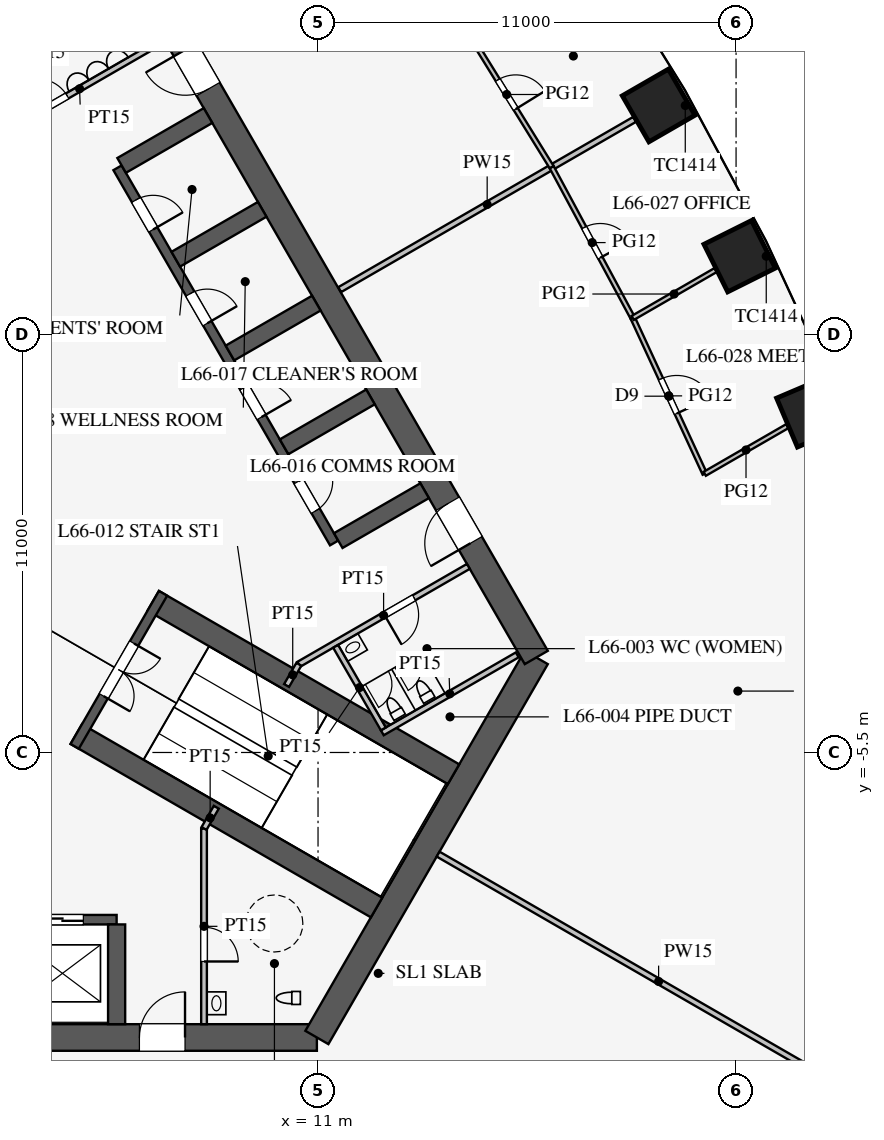
"""IFC4 building model, lengths in metres.
Left out: names, types, materials, properties, quantities, classifications, styles, units other than length and angle.
Written with IfcOpenShell. Run it as: python <this file> out.ifc"""

import sys

from ifc_helpers import new_model, si_unit, direction, frame, frame_2d, origin, origin_2d, place, context, subcontext, project, spatial, rectangle, extrude, element, fill, save


model = new_model("IFC4")
c1 = context("Model", 3, precision=1e-05, world=origin(), true_north=direction((0.0, 1.0)))
c2 = subcontext(c1, "Body", "Model", "MODEL_VIEW")
j1 = project(units=[si_unit("LENGTHUNIT", "METRE"), si_unit("PLANEANGLEUNIT", "RADIAN")], contexts=[c1])
p1 = place(None, origin())
s1 = spatial("IfcSite", under=j1, at=p1, CompositionType="ELEMENT")
p2 = place(p1, origin())
s2 = spatial("IfcBuilding", under=s1, at=p2, CompositionType="ELEMENT")
p3 = place(p2, frame((0.0, 0.0, 288.9)))
s3 = spatial("IfcBuildingStorey", under=s2, at=p3, CompositionType="ELEMENT", Elevation=288.9)
for number, where, z_axis, x_axis in (
    (1, (23.985, 3.455, 0.0), (0.0, 0.0, 1.0), (-0.391, 0.92, 0.0)),
    (2, (22.094, 7.56, 0.0), (0.0, 0.0, 1.0), (-0.447, 0.895, 0.0)),
    (3, (19.963, 11.526, 0.0), (0.0, 0.0, 1.0), (-0.5, 0.866, 0.0)),
):
    element("IfcColumn", number, at=place(p3, frame(where, z_axis=z_axis, x_axis=x_axis)), inside=s3, PredefinedType="COLUMN", context=c2, shape_type="SweptSolid", body=[
        extrude(rectangle(XDim=1.4, YDim=1.4, at=origin_2d()), origin(), (0.0, 0.0, 1.0), 4.2),
    ])
p4 = place(p3, frame((-10.97, -13.0, 0.0), z_axis=(0.0, 0.0, 1.0), x_axis=(1.0, 0.0, 0.0)))
e4 = element("IfcWall", 4, at=p4, inside=s3, PredefinedType="SHEAR", context=c2, shape_type="SweptSolid", body=[
    extrude(rectangle(XDim=21.939, YDim=0.7, at=frame_2d((10.97, 0.0))), origin(), (0.0, 0.0, 1.0), 4.2),
])
p5 = place(p4, frame((17.27, 0.0, 0.0)))
e5 = element("IfcOpeningElement", 5, at=p5, cuts=e4, PredefinedType="OPENING", context=c2, shape_type="SweptSolid", body=[
    extrude(rectangle(XDim=1.2, YDim=2.1, at=frame_2d((0.6, 1.05))), frame((0.0, 0.36, 0.0), z_axis=(0.0, -1.0, 0.0), x_axis=(1.0, 0.0, 0.0)), (0.0, 0.0, 1.0), 0.72),
])
p6 = place(p4, frame((3.47, 0.0, 0.0)))
e6 = element("IfcOpeningElement", 6, at=p6, cuts=e4, PredefinedType="OPENING", context=c2, shape_type="SweptSolid", body=[
    extrude(rectangle(XDim=1.2, YDim=2.1, at=frame_2d((0.6, 1.05))), frame((0.0, 0.36, 0.0), z_axis=(0.0, -1.0, 0.0), x_axis=(1.0, 0.0, 0.0)), (0.0, 0.0, 1.0), 0.72),
])
p7 = place(p3, frame((10.97, -13.0, 0.0), z_axis=(0.0, 0.0, 1.0), x_axis=(0.499995765644, 0.866027848477, 0.0)))
e7 = element("IfcWall", 7, at=p7, inside=s3, PredefinedType="SHEAR", context=c2, shape_type="SweptSolid", body=[
    extrude(rectangle(XDim=11.547, YDim=0.7, at=frame_2d((5.773, 0.0))), origin(), (0.0, 0.0, 1.0), 4.2),
])
p8 = place(p3, frame((16.743, -3.0, 0.0), z_axis=(0.0, 0.0, 1.0), x_axis=(-0.500002442456, 0.866023993627, 0.0)))
e8 = element("IfcWall", 8, at=p8, inside=s3, PredefinedType="SHEAR", context=c2, shape_type="SweptSolid", body=[
    extrude(rectangle(XDim=21.939, YDim=0.7, at=frame_2d((10.97, 0.0))), origin(), (0.0, 0.0, 1.0), 4.2),
])
p9 = place(p8, frame((17.27, 0.0, 0.0)))
e9 = element("IfcOpeningElement", 9, at=p9, cuts=e8, PredefinedType="OPENING", context=c2, shape_type="SweptSolid", body=[
    extrude(rectangle(XDim=1.2, YDim=2.1, at=frame_2d((0.6, 1.05))), frame((0.0, 0.36, 0.0), z_axis=(0.0, -1.0, 0.0), x_axis=(1.0, 0.0, 0.0)), (0.0, 0.0, 1.0), 0.72),
])
p10 = place(p8, frame((3.47, 0.0, 0.0)))
e10 = element("IfcOpeningElement", 10, at=p10, cuts=e8, PredefinedType="OPENING", context=c2, shape_type="SweptSolid", body=[
    extrude(rectangle(XDim=1.2, YDim=2.1, at=frame_2d((0.6, 1.05))), frame((0.0, 0.36, 0.0), z_axis=(0.0, -1.0, 0.0), x_axis=(1.0, 0.0, 0.0)), (0.0, 0.0, 1.0), 0.72),
])
p11 = place(p3, frame((-5.7, -9.9, 0.0), z_axis=(0.0, 0.0, 1.0), x_axis=(1.0, 0.0, 0.0)))
e11 = element("IfcWall", 11, at=p11, inside=s3, PredefinedType="SHEAR", context=c2, shape_type="SweptSolid", body=[
    extrude(rectangle(XDim=11.4, YDim=0.25, at=frame_2d((5.7, 0.0))), origin(), (0.0, 0.0, 1.0), 4.2),
])
p12 = place(p11, frame((0.875, 0.0, 0.0)))
e12 = element("IfcOpeningElement", 12, at=p12, cuts=e11, PredefinedType="OPENING", context=c2, shape_type="SweptSolid", body=[
    extrude(rectangle(XDim=1.1, YDim=2.2, at=frame_2d((0.55, 1.1))), frame((0.0, 0.135, 0.0), z_axis=(0.0, -1.0, 0.0), x_axis=(1.0, 0.0, 0.0)), (0.0, 0.0, 1.0), 0.27),
])
p13 = place(p11, frame((3.725, 0.0, 0.0)))
e13 = element("IfcOpeningElement", 13, at=p13, cuts=e11, PredefinedType="OPENING", context=c2, shape_type="SweptSolid", body=[
    extrude(rectangle(XDim=1.1, YDim=2.2, at=frame_2d((0.55, 1.1))), frame((0.0, 0.135, 0.0), z_axis=(0.0, -1.0, 0.0), x_axis=(1.0, 0.0, 0.0)), (0.0, 0.0, 1.0), 0.27),
])
p14 = place(p11, frame((6.575, 0.0, 0.0)))
e14 = element("IfcOpeningElement", 14, at=p14, cuts=e11, PredefinedType="OPENING", context=c2, shape_type="SweptSolid", body=[
    extrude(rectangle(XDim=1.1, YDim=2.2, at=frame_2d((0.55, 1.1))), frame((0.0, 0.135, 0.0), z_axis=(0.0, -1.0, 0.0), x_axis=(1.0, 0.0, 0.0)), (0.0, 0.0, 1.0), 0.27),
])
p15 = place(p11, frame((9.425, 0.0, 0.0)))
e15 = element("IfcOpeningElement", 15, at=p15, cuts=e11, PredefinedType="OPENING", context=c2, shape_type="SweptSolid", body=[
    extrude(rectangle(XDim=1.1, YDim=2.2, at=frame_2d((0.55, 1.1))), frame((0.0, 0.135, 0.0), z_axis=(0.0, -1.0, 0.0), x_axis=(1.0, 0.0, 0.0)), (0.0, 0.0, 1.0), 0.27),
])
p16 = place(p3, frame((5.7, -10.025, 0.0), z_axis=(0.0, 0.0, 1.0), x_axis=(0.0, -1.0, 0.0)))
e16 = element("IfcWall", 16, at=p16, inside=s3, PredefinedType="SHEAR", context=c2, shape_type="SweptSolid", body=[
    extrude(rectangle(XDim=2.625, YDim=0.45, at=frame_2d((1.312, 0.0))), origin(), (0.0, 0.0, 1.0), 4.2),
])
p17 = place(p3, frame((11.424, 0.014, 0.0), z_axis=(0.0, 0.0, 1.0), x_axis=(-0.500001763848, 0.866024385424, 0.0)))
e17 = element("IfcWall", 17, at=p17, inside=s3, PredefinedType="SHEAR", context=c2, shape_type="SweptSolid", body=[
    extrude(rectangle(XDim=11.4, YDim=0.25, at=frame_2d((5.7, 0.0))), origin(), (0.0, 0.0, 1.0), 4.2),
])
p18 = place(p17, frame((0.975, 0.0, 0.0)))
e18 = element("IfcOpeningElement", 18, at=p18, cuts=e17, PredefinedType="OPENING", context=c2, shape_type="SweptSolid", body=[
    extrude(rectangle(XDim=0.9, YDim=2.1, at=frame_2d((0.45, 1.05))), frame((0.0, 0.135, 0.0), z_axis=(0.0, -1.0, 0.0), x_axis=(1.0, 0.0, 0.0)), (0.0, 0.0, 1.0), 0.27),
])
p19 = place(p17, frame((3.825, 0.0, 0.0)))
e19 = element("IfcOpeningElement", 19, at=p19, cuts=e17, PredefinedType="OPENING", context=c2, shape_type="SweptSolid", body=[
    extrude(rectangle(XDim=0.9, YDim=2.1, at=frame_2d((0.45, 1.05))), frame((0.0, 0.135, 0.0), z_axis=(0.0, -1.0, 0.0), x_axis=(1.0, 0.0, 0.0)), (0.0, 0.0, 1.0), 0.27),
])
p20 = place(p17, frame((6.675, 0.0, 0.0)))
e20 = element("IfcOpeningElement", 20, at=p20, cuts=e17, PredefinedType="OPENING", context=c2, shape_type="SweptSolid", body=[
    extrude(rectangle(XDim=0.9, YDim=2.1, at=frame_2d((0.45, 1.05))), frame((0.0, 0.135, 0.0), z_axis=(0.0, -1.0, 0.0), x_axis=(1.0, 0.0, 0.0)), (0.0, 0.0, 1.0), 0.27),
])
p21 = place(p17, frame((9.525, 0.0, 0.0)))
e21 = element("IfcOpeningElement", 21, at=p21, cuts=e17, PredefinedType="OPENING", context=c2, shape_type="SweptSolid", body=[
    extrude(rectangle(XDim=0.9, YDim=2.1, at=frame_2d((0.45, 1.05))), frame((0.0, 0.135, 0.0), z_axis=(0.0, -1.0, 0.0), x_axis=(1.0, 0.0, 0.0)), (0.0, 0.0, 1.0), 0.27),
])
for number, where, z_axis, x_axis in (
    (22, (11.532, 0.076, 0.0), (0.0, 0.0, 1.0), (0.866, 0.5, 0.0)),
    (23, (10.107, 2.544, 0.0), (0.0, 0.0, 1.0), (0.866, 0.5, 0.0)),
    (24, (8.682, 5.012, 0.0), (0.0, 0.0, 1.0), (0.866, 0.5, 0.0)),
    (25, (7.257, 7.481, 0.0), (0.0, 0.0, 1.0), (0.866, 0.5, 0.0)),
    (26, (5.832, 9.949, 0.0), (0.0, 0.0, 1.0), (0.866, 0.5, 0.0)),
):
    element("IfcWall", number, at=place(p3, frame(where, z_axis=z_axis, x_axis=x_axis)), inside=s3, PredefinedType="SHEAR", context=c2, shape_type="SweptSolid", body=[
        extrude(rectangle(XDim=2.625, YDim=0.45, at=frame_2d((1.312, 0.0))), origin(), (0.0, 0.0, 1.0), 4.2),
    ])
for number, where, z_axis, x_axis in (
    (27, (4.638, -5.016, 0.0), (0.0, 0.0, 1.0), (0.866, -0.5, 0.0)),
    (28, (6.663, -1.509, 0.0), (0.0, 0.0, 1.0), (0.866, -0.5, 0.0)),
):
    element("IfcWall", number, at=place(p3, frame(where, z_axis=z_axis, x_axis=x_axis)), inside=s3, PredefinedType="SHEAR", context=c2, shape_type="SweptSolid", body=[
        extrude(rectangle(XDim=9.125, YDim=0.6, at=frame_2d((4.562, 0.0))), origin(), (0.0, 0.0, 1.0), 4.2),
    ])
p22 = place(p3, frame((4.597, -5.339, 0.0), z_axis=(0.0, 0.0, 1.0), x_axis=(0.499984536904, 0.866034331223, 0.0)))
e29 = element("IfcWall", 29, at=p22, inside=s3, PredefinedType="SHEAR", context=c2, shape_type="SweptSolid", body=[
    extrude(rectangle(XDim=4.65, YDim=0.25, at=frame_2d((2.325, 0.0))), origin(), (0.0, 0.0, 1.0), 4.2),
])
p23 = place(p22, frame((1.525, 0.0, 0.0)))
e30 = element("IfcOpeningElement", 30, at=p23, cuts=e29, PredefinedType="OPENING", context=c2, shape_type="SweptSolid", body=[
    extrude(rectangle(XDim=1.6, YDim=2.1, at=frame_2d((0.8, 1.05))), frame((0.0, 0.135, 0.0), z_axis=(0.0, -1.0, 0.0), x_axis=(1.0, 0.0, 0.0)), (0.0, 0.0, 1.0), 0.27),
])
p24 = place(p3, frame((8.0, -7.5, 0.0), z_axis=(0.0, 0.0, 1.0), x_axis=(0.0, -1.0, 0.0)))
e31 = element("IfcWall", 31, at=p24, inside=s3, PredefinedType="PARTITIONING", context=c2, shape_type="SweptSolid", body=[
    extrude(rectangle(XDim=5.15, YDim=0.15, at=frame_2d((2.575, 0.0))), origin(), (0.0, 0.0, 1.0), 4.0),
])
p25 = place(p24, frame((2.6, 0.0, 0.0)))
e32 = element("IfcOpeningElement", 32, at=p25, cuts=e31, PredefinedType="OPENING", context=c2, shape_type="SweptSolid", body=[
    extrude(rectangle(XDim=0.9, YDim=2.1, at=frame_2d((0.45, 1.05))), frame((0.0, 0.085, 0.0), z_axis=(0.0, -1.0, 0.0), x_axis=(1.0, 0.0, 0.0)), (0.0, 0.0, 1.0), 0.17),
])
p26 = place(p3, frame((2.495, 10.678, 0.0), z_axis=(0.0, 0.0, 1.0), x_axis=(0.866037967349, 0.499978238636, 0.0)))
e33 = element("IfcWall", 33, at=p26, inside=s3, PredefinedType="PARTITIONING", context=c2, shape_type="SweptSolid", body=[
    extrude(rectangle(XDim=5.15, YDim=0.15, at=frame_2d((2.575, 0.0))), origin(), (0.0, 0.0, 1.0), 4.0),
])
p27 = place(p26, frame((1.3, 0.0, 0.0)))
e34 = element("IfcOpeningElement", 34, at=p27, cuts=e33, PredefinedType="OPENING", context=c2, shape_type="SweptSolid", body=[
    extrude(rectangle(XDim=0.9, YDim=2.1, at=frame_2d((0.45, 1.05))), frame((0.0, 0.085, 0.0), z_axis=(0.0, -1.0, 0.0), x_axis=(1.0, 0.0, 0.0)), (0.0, 0.0, 1.0), 0.17),
])
p28 = place(p3, frame((10.495, -3.178, 0.0), z_axis=(0.0, 0.0, 1.0), x_axis=(0.866037967349, 0.499978238636, 0.0)))
e35 = element("IfcWall", 35, at=p28, inside=s3, PredefinedType="PARTITIONING", context=c2, shape_type="SweptSolid", body=[
    extrude(rectangle(XDim=5.15, YDim=0.15, at=frame_2d((2.575, 0.0))), origin(), (0.0, 0.0, 1.0), 4.0),
])
p29 = place(p28, frame((2.6, 0.0, 0.0)))
e36 = element("IfcOpeningElement", 36, at=p29, cuts=e35, PredefinedType="OPENING", context=c2, shape_type="SweptSolid", body=[
    extrude(rectangle(XDim=0.9, YDim=2.1, at=frame_2d((0.45, 1.05))), frame((0.0, 0.085, 0.0), z_axis=(0.0, -1.0, 0.0), x_axis=(1.0, 0.0, 0.0)), (0.0, 0.0, 1.0), 0.17),
])
for number, where, z_axis, x_axis in (
    (37, (8.0, -7.5, 0.0), (0.0, 0.0, 1.0), (0.5, 0.866, 0.0)),
    (38, (10.495, -3.178, 0.0), (0.0, 0.0, 1.0), (-0.5, -0.866, 0.0)),
):
    element("IfcWall", number, at=place(p3, frame(where, z_axis=z_axis, x_axis=x_axis)), inside=s3, PredefinedType="PARTITIONING", context=c2, shape_type="SweptSolid", body=[
        extrude(rectangle(XDim=0.645, YDim=0.15, at=frame_2d((0.323, 0.0))), origin(), (0.0, 0.0, 1.0), 4.0),
    ])
p30 = place(p3, frame((12.691, -4.982, 0.0), z_axis=(0.0, 0.0, 1.0), x_axis=(0.8660249478, 0.500000789788, 0.0)))
e39 = element("IfcWall", 39, at=p30, inside=s3, PredefinedType="PARTITIONING", context=c2, shape_type="SweptSolid", body=[
    extrude(rectangle(XDim=4.1, YDim=0.15, at=frame_2d((2.05, 0.0))), origin(), (0.0, 0.0, 1.0), 4.0),
])
p31 = place(p3, frame((11.464, -2.706, 0.0), z_axis=(0.0, 0.0, 1.0), x_axis=(0.50001992892, -0.866013897511, 0.0)))
e40 = element("IfcWall", 40, at=p31, inside=s3, PredefinedType="PARTITIONING", context=c2, shape_type="SweptSolid", body=[
    extrude(rectangle(XDim=2.51, YDim=0.15, at=frame_2d((1.255, 0.0))), origin(), (0.0, 0.0, 1.0), 4.0),
])
p32 = place(p3, frame((14.159, -8.175, 0.0), z_axis=(0.0, 0.0, 1.0), x_axis=(0.866026905467, -0.499997399001, 0.0)))
e41 = element("IfcWall", 41, at=p32, inside=s3, PredefinedType="PARTITIONING", context=c2, shape_type="SweptSolid", body=[
    extrude(rectangle(XDim=13.4, YDim=0.15, at=frame_2d((6.7, 0.0))), origin(), (0.0, 0.0, 1.0), 2.5),
])
p33 = place(p3, frame((11.57, 6.68, 0.0), z_axis=(0.0, 0.0, 1.0), x_axis=(0.866018180823, 0.500012510328, 0.0)))
e42 = element("IfcWall", 42, at=p33, inside=s3, PredefinedType="PARTITIONING", context=c2, shape_type="SweptSolid", body=[
    extrude(rectangle(XDim=8.962, YDim=0.15, at=frame_2d((4.481, 0.0))), origin(), (0.0, 0.0, 1.0), 3.3),
])
p34 = place(p3, frame((17.149, 9.901, 0.0), z_axis=(0.0, 0.0, 1.0), x_axis=(-0.525981173851, 0.850496210899, 0.0)))
e43 = element("IfcWall", 43, at=p34, inside=s3, PredefinedType="PARTITIONING", context=c2, shape_type="SweptSolid", body=[
    extrude(rectangle(XDim=4.502, YDim=0.12, at=frame_2d((2.251, 0.0))), origin(), (0.0, 0.0, 1.0), 2.9),
])
p35 = place(p34, frame((1.8, 0.0, 0.15)))
e44 = element("IfcOpeningElement", 44, at=p35, cuts=e43, PredefinedType="OPENING", context=c2, shape_type="SweptSolid", body=[
    extrude(rectangle(XDim=0.9, YDim=2.1, at=frame_2d((0.45, 1.05))), frame((0.0, 0.07, 0.0), z_axis=(0.0, -1.0, 0.0), x_axis=(1.0, 0.0, 0.0)), (0.0, 0.0, 1.0), 0.14),
])
p36 = place(p3, frame((19.281, 5.936, 0.0), z_axis=(0.0, 0.0, 1.0), x_axis=(-0.473566170147, 0.880758242932, 0.0)))
e45 = element("IfcWall", 45, at=p36, inside=s3, PredefinedType="PARTITIONING", context=c2, shape_type="SweptSolid", body=[
    extrude(rectangle(XDim=4.502, YDim=0.12, at=frame_2d((2.251, 0.0))), origin(), (0.0, 0.0, 1.0), 2.9),
])
p37 = place(p36, frame((1.8, 0.0, 0.15)))
e46 = element("IfcOpeningElement", 46, at=p37, cuts=e45, PredefinedType="OPENING", context=c2, shape_type="SweptSolid", body=[
    extrude(rectangle(XDim=0.9, YDim=2.1, at=frame_2d((0.45, 1.05))), frame((0.0, 0.07, 0.0), z_axis=(0.0, -1.0, 0.0), x_axis=(1.0, 0.0, 0.0)), (0.0, 0.0, 1.0), 0.14),
])
p38 = place(p3, frame((21.175, 1.833, 0.0), z_axis=(0.0, 0.0, 1.0), x_axis=(-0.419270595022, 0.907861315483, 0.0)))
e47 = element("IfcWall", 47, at=p38, inside=s3, PredefinedType="PARTITIONING", context=c2, shape_type="SweptSolid", body=[
    extrude(rectangle(XDim=4.519, YDim=0.12, at=frame_2d((2.259, 0.0))), origin(), (0.0, 0.0, 1.0), 2.9),
])
p39 = place(p38, frame((1.75, 0.0, 0.15)))
e48 = element("IfcOpeningElement", 48, at=p39, cuts=e47, PredefinedType="OPENING", context=c2, shape_type="SweptSolid", body=[
    extrude(rectangle(XDim=1.0, YDim=2.1, at=frame_2d((0.5, 1.05))), frame((0.0, 0.07, 0.0), z_axis=(0.0, -1.0, 0.0), x_axis=(1.0, 0.0, 0.0)), (0.0, 0.0, 1.0), 0.14),
])
p40 = place(p3, frame((19.281, 5.936, 0.0), z_axis=(0.0, 0.0, 1.0), x_axis=(0.866032146685, 0.499988320771, 0.0)))
e49 = element("IfcWall", 49, at=p40, inside=s3, PredefinedType="PARTITIONING", context=c2, shape_type="SweptSolid", body=[
    extrude(rectangle(XDim=2.517, YDim=0.12, at=frame_2d((1.259, 0.0))), origin(), (0.0, 0.0, 1.0), 2.9),
])
p41 = place(p3, frame((21.175, 1.833, 0.0), z_axis=(0.0, 0.0, 1.0), x_axis=(0.866042990507, 0.499969537666, 0.0)))
e50 = element("IfcWall", 50, at=p41, inside=s3, PredefinedType="PARTITIONING", context=c2, shape_type="SweptSolid", body=[
    extrude(rectangle(XDim=2.509, YDim=0.12, at=frame_2d((1.254, 0.0))), origin(), (0.0, 0.0, 1.0), 2.9),
])
p42 = place(p25, origin())
e51 = element("IfcDoor", 51, at=p42, inside=s3, OperationType="SINGLE_SWING_RIGHT", PredefinedType="DOOR", context=c2, shape_type="SweptSolid", body=[
    extrude(rectangle(XDim=0.9, YDim=2.1, at=frame_2d((0.45, 1.05))), frame((0.0, 0.025, 0.0), z_axis=(0.0, -1.0, 0.0), x_axis=(1.0, 0.0, 0.0)), (0.0, 0.0, 1.0), 0.05),
])
fill(e32, e51)
p43 = place(p27, origin())
e52 = element("IfcDoor", 52, at=p43, inside=s3, OperationType="SINGLE_SWING_LEFT", PredefinedType="DOOR", context=c2, shape_type="SweptSolid", body=[
    extrude(rectangle(XDim=0.9, YDim=2.1, at=frame_2d((0.45, 1.05))), frame((0.0, 0.025, 0.0), z_axis=(0.0, -1.0, 0.0), x_axis=(1.0, 0.0, 0.0)), (0.0, 0.0, 1.0), 0.05),
])
fill(e34, e52)
p44 = place(p29, frame((0.9, 0.0, 0.0), z_axis=(0.0, 0.0, 1.0), x_axis=(-1.0, 0.0, 0.0)))
e53 = element("IfcDoor", 53, at=p44, inside=s3, OperationType="SINGLE_SWING_RIGHT", PredefinedType="DOOR", context=c2, shape_type="SweptSolid", body=[
    extrude(rectangle(XDim=0.9, YDim=2.1, at=frame_2d((0.45, 1.05))), frame((0.0, 0.025, 0.0), z_axis=(0.0, -1.0, 0.0), x_axis=(1.0, 0.0, 0.0)), (0.0, 0.0, 1.0), 0.05),
])
fill(e36, e53)
p45 = place(p23, frame((1.6, 0.0, 0.0), z_axis=(0.0, 0.0, 1.0), x_axis=(-1.0, 0.0, 0.0)))
e54 = element("IfcDoor", 54, at=p45, inside=s3, OperationType="DOUBLE_DOOR_SINGLE_SWING", PredefinedType="DOOR", context=c2, shape_type="SweptSolid", body=[
    extrude(rectangle(XDim=1.6, YDim=2.1, at=frame_2d((0.8, 1.05))), frame((0.0, 0.025, 0.0), z_axis=(0.0, -1.0, 0.0), x_axis=(1.0, 0.0, 0.0)), (0.0, 0.0, 1.0), 0.05),
])
fill(e30, e54)
p46 = place(p5, origin())
e55 = element("IfcDoor", 55, at=p46, inside=s3, OperationType="SINGLE_SWING_RIGHT", PredefinedType="DOOR", context=c2, shape_type="SweptSolid", body=[
    extrude(rectangle(XDim=1.2, YDim=2.1, at=frame_2d((0.6, 1.05))), frame((0.0, 0.025, 0.0), z_axis=(0.0, -1.0, 0.0), x_axis=(1.0, 0.0, 0.0)), (0.0, 0.0, 1.0), 0.05),
])
fill(e5, e55)
p47 = place(p9, origin())
e56 = element("IfcDoor", 56, at=p47, inside=s3, OperationType="SINGLE_SWING_RIGHT", PredefinedType="DOOR", context=c2, shape_type="SweptSolid", body=[
    extrude(rectangle(XDim=1.2, YDim=2.1, at=frame_2d((0.6, 1.05))), frame((0.0, 0.025, 0.0), z_axis=(0.0, -1.0, 0.0), x_axis=(1.0, 0.0, 0.0)), (0.0, 0.0, 1.0), 0.05),
])
fill(e9, e56)
p48 = place(p10, origin())
e57 = element("IfcDoor", 57, at=p48, inside=s3, OperationType="SINGLE_SWING_LEFT", PredefinedType="DOOR", context=c2, shape_type="SweptSolid", body=[
    extrude(rectangle(XDim=1.2, YDim=2.1, at=frame_2d((0.6, 1.05))), frame((0.0, 0.025, 0.0), z_axis=(0.0, -1.0, 0.0), x_axis=(1.0, 0.0, 0.0)), (0.0, 0.0, 1.0), 0.05),
])
fill(e10, e57)
p49 = place(p18, frame((0.9, 0.0, 0.0), z_axis=(0.0, 0.0, 1.0), x_axis=(-1.0, 0.0, 0.0)))
e58 = element("IfcDoor", 58, at=p49, inside=s3, OperationType="SINGLE_SWING_LEFT", PredefinedType="DOOR", context=c2, shape_type="SweptSolid", body=[
    extrude(rectangle(XDim=0.9, YDim=2.1, at=frame_2d((0.45, 1.05))), frame((0.0, 0.025, 0.0), z_axis=(0.0, -1.0, 0.0), x_axis=(1.0, 0.0, 0.0)), (0.0, 0.0, 1.0), 0.05),
])
fill(e18, e58)
p50 = place(p19, frame((0.9, 0.0, 0.0), z_axis=(0.0, 0.0, 1.0), x_axis=(-1.0, 0.0, 0.0)))
e59 = element("IfcDoor", 59, at=p50, inside=s3, OperationType="SINGLE_SWING_RIGHT", PredefinedType="DOOR", context=c2, shape_type="SweptSolid", body=[
    extrude(rectangle(XDim=0.9, YDim=2.1, at=frame_2d((0.45, 1.05))), frame((0.0, 0.025, 0.0), z_axis=(0.0, -1.0, 0.0), x_axis=(1.0, 0.0, 0.0)), (0.0, 0.0, 1.0), 0.05),
])
fill(e19, e59)
p51 = place(p20, frame((0.9, 0.0, 0.0), z_axis=(0.0, 0.0, 1.0), x_axis=(-1.0, 0.0, 0.0)))
e60 = element("IfcDoor", 60, at=p51, inside=s3, OperationType="SINGLE_SWING_RIGHT", PredefinedType="DOOR", context=c2, shape_type="SweptSolid", body=[
    extrude(rectangle(XDim=0.9, YDim=2.1, at=frame_2d((0.45, 1.05))), frame((0.0, 0.025, 0.0), z_axis=(0.0, -1.0, 0.0), x_axis=(1.0, 0.0, 0.0)), (0.0, 0.0, 1.0), 0.05),
])
fill(e20, e60)
p52 = place(p21, frame((0.9, 0.0, 0.0), z_axis=(0.0, 0.0, 1.0), x_axis=(-1.0, 0.0, 0.0)))
e61 = element("IfcDoor", 61, at=p52, inside=s3, OperationType="SINGLE_SWING_RIGHT", PredefinedType="DOOR", context=c2, shape_type="SweptSolid", body=[
    extrude(rectangle(XDim=0.9, YDim=2.1, at=frame_2d((0.45, 1.05))), frame((0.0, 0.025, 0.0), z_axis=(0.0, -1.0, 0.0), x_axis=(1.0, 0.0, 0.0)), (0.0, 0.0, 1.0), 0.05),
])
fill(e21, e61)
p53 = place(p35, frame((0.9, 0.0, 0.0), z_axis=(0.0, 0.0, 1.0), x_axis=(-1.0, 0.0, 0.0)))
e62 = element("IfcDoor", 62, at=p53, inside=s3, OperationType="SINGLE_SWING_RIGHT", PredefinedType="DOOR", context=c2, shape_type="SweptSolid", body=[
    extrude(rectangle(XDim=0.9, YDim=2.1, at=frame_2d((0.45, 1.05))), frame((0.0, 0.025, 0.0), z_axis=(0.0, -1.0, 0.0), x_axis=(1.0, 0.0, 0.0)), (0.0, 0.0, 1.0), 0.05),
])
fill(e44, e62)
p54 = place(p37, frame((0.9, 0.0, 0.0), z_axis=(0.0, 0.0, 1.0), x_axis=(-1.0, 0.0, 0.0)))
e63 = element("IfcDoor", 63, at=p54, inside=s3, OperationType="SINGLE_SWING_RIGHT", PredefinedType="DOOR", context=c2, shape_type="SweptSolid", body=[
    extrude(rectangle(XDim=0.9, YDim=2.1, at=frame_2d((0.45, 1.05))), frame((0.0, 0.025, 0.0), z_axis=(0.0, -1.0, 0.0), x_axis=(1.0, 0.0, 0.0)), (0.0, 0.0, 1.0), 0.05),
])
fill(e46, e63)
p55 = place(p39, frame((1.0, 0.0, 0.0), z_axis=(0.0, 0.0, 1.0), x_axis=(-1.0, 0.0, 0.0)))
e64 = element("IfcDoor", 64, at=p55, inside=s3, OperationType="SINGLE_SWING_RIGHT", PredefinedType="DOOR", context=c2, shape_type="SweptSolid", body=[
    extrude(rectangle(XDim=1.0, YDim=2.1, at=frame_2d((0.5, 1.05))), frame((0.0, 0.025, 0.0), z_axis=(0.0, -1.0, 0.0), x_axis=(1.0, 0.0, 0.0)), (0.0, 0.0, 1.0), 0.05),
])
fill(e48, e64)
p56 = place(p15, origin())
e65 = element("IfcDoor", 65, at=p56, inside=s3, OperationType="DOUBLE_DOOR_SLIDING", PredefinedType="DOOR", context=c2, shape_type="SweptSolid", body=[
    extrude(rectangle(XDim=1.1, YDim=2.2, at=frame_2d((0.55, 1.1))), frame((0.0, 0.025, 0.0), z_axis=(0.0, -1.0, 0.0), x_axis=(1.0, 0.0, 0.0)), (0.0, 0.0, 1.0), 0.05),
])
fill(e15, e65)
save(model, sys.argv[1])
